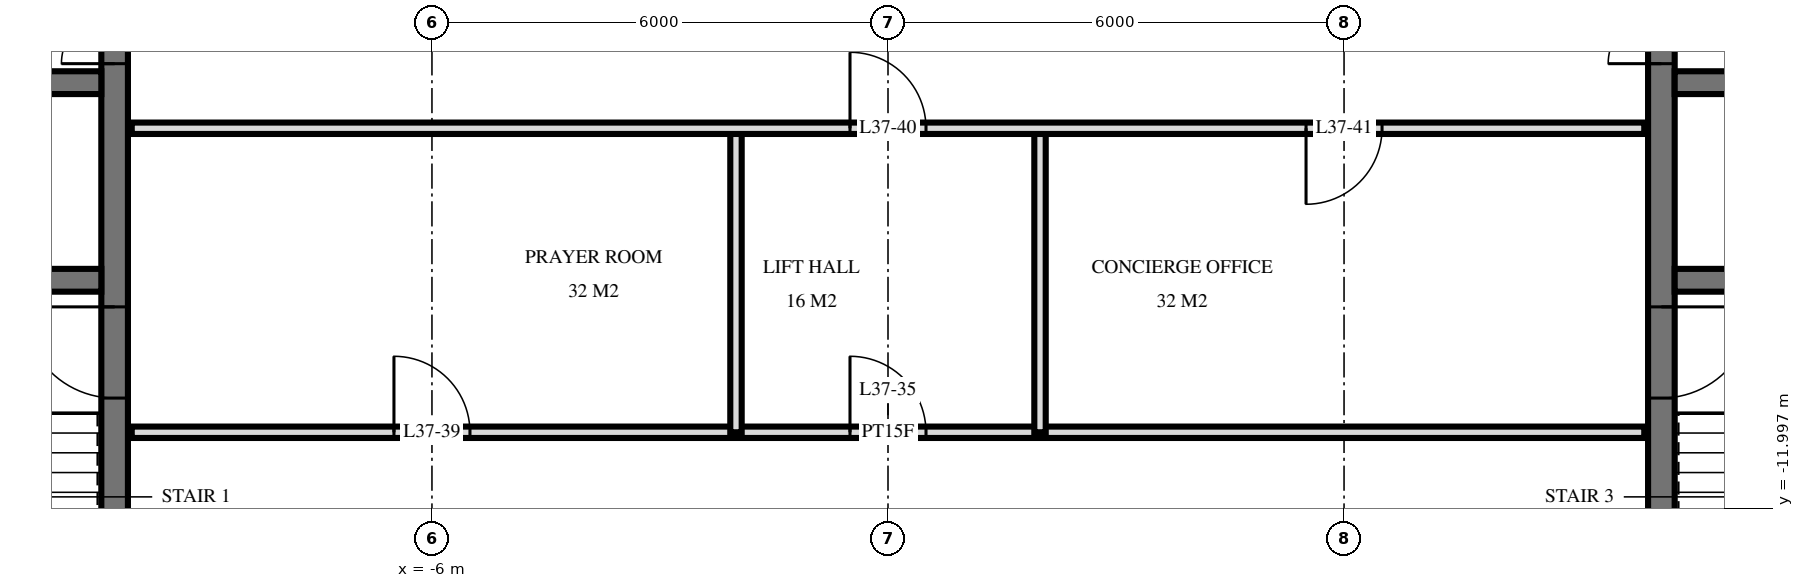
"""IFC4 building model, lengths in metres.
Left out: names, types, materials, properties, quantities, classifications, styles, units other than length and angle.
Written with IfcOpenShell. Run it as: python <this file> out.ifc"""

import sys

from ifc_helpers import new_model, si_unit, direction, frame, frame_2d, origin, place, context, subcontext, project, spatial, rectangle, extrude, element, fill, save


model = new_model("IFC4")
c1 = context("Model", 3, precision=1e-05, world=origin(), true_north=direction((0.0, 1.0)))
c2 = subcontext(c1, "Body", "Model", "MODEL_VIEW")
j1 = project(units=[si_unit("LENGTHUNIT", "METRE"), si_unit("PLANEANGLEUNIT", "RADIAN")], contexts=[c1])
p1 = place(None, origin())
s1 = spatial("IfcSite", under=j1, at=p1, CompositionType="ELEMENT")
p2 = place(p1, origin())
s2 = spatial("IfcBuilding", under=s1, at=p2, CompositionType="ELEMENT")
p3 = place(p2, frame((0.0, 0.0, 145.2)))
s3 = spatial("IfcBuildingStorey", under=s2, at=p3, CompositionType="ELEMENT", Elevation=145.2)
p4 = place(p3, frame((-10.175, -14.55, 0.0), z_axis=(0.0, 0.0, 1.0), x_axis=(0.0, 1.0, 0.0)))
e1 = element("IfcWall", 1, at=p4, inside=s3, PredefinedType="SHEAR", context=c2, shape_type="SweptSolid", body=[
    extrude(rectangle(XDim=14.1, YDim=0.35, at=frame_2d((7.05, 0.0))), origin(), (0.0, 0.0, 1.0), 3.6),
])
p5 = place(p4, frame((8.4, 0.0, 0.0)))
e2 = element("IfcOpeningElement", 2, at=p5, cuts=e1, PredefinedType="OPENING", context=c2, shape_type="SweptSolid", body=[
    extrude(rectangle(XDim=1.4, YDim=2.4, at=frame_2d((0.7, 1.2))), frame((0.0, 0.185, 0.0), z_axis=(0.0, -1.0, 0.0), x_axis=(1.0, 0.0, 0.0)), (0.0, 0.0, 1.0), 0.37),
])
p6 = place(p4, frame((10.0, 0.0, 0.0)))
e3 = element("IfcOpeningElement", 3, at=p6, cuts=e1, PredefinedType="OPENING", context=c2, shape_type="SweptSolid", body=[
    extrude(rectangle(XDim=1.4, YDim=2.4, at=frame_2d((0.7, 1.2))), frame((0.0, 0.185, 0.0), z_axis=(0.0, -1.0, 0.0), x_axis=(1.0, 0.0, 0.0)), (0.0, 0.0, 1.0), 0.37),
])
p7 = place(p4, frame((4.0, 0.0, 0.0)))
e4 = element("IfcOpeningElement", 4, at=p7, cuts=e1, PredefinedType="OPENING", context=c2, shape_type="SweptSolid", body=[
    extrude(rectangle(XDim=1.2, YDim=2.1, at=frame_2d((0.6, 1.05))), frame((0.0, 0.185, 0.0), z_axis=(0.0, -1.0, 0.0), x_axis=(1.0, 0.0, 0.0)), (0.0, 0.0, 1.0), 0.37),
])
p8 = place(p3, frame((-24.05, -6.4, 0.0), z_axis=(0.0, 0.0, 1.0), x_axis=(1.0, 0.0, 0.0)))
e5 = element("IfcWall", 5, at=p8, inside=s3, PredefinedType="SHEAR", context=c2, shape_type="SweptSolid", body=[
    extrude(rectangle(XDim=13.7, YDim=0.3, at=frame_2d((6.85, 0.0))), origin(), (0.0, 0.0, 1.0), 3.6),
])
p9 = place(p8, frame((0.55, 0.0, 0.0)))
e6 = element("IfcOpeningElement", 6, at=p9, cuts=e5, PredefinedType="OPENING", context=c2, shape_type="SweptSolid", body=[
    extrude(rectangle(XDim=1.1, YDim=2.1, at=frame_2d((0.55, 1.05))), frame((0.0, 0.16, 0.0), z_axis=(0.0, -1.0, 0.0), x_axis=(1.0, 0.0, 0.0)), (0.0, 0.0, 1.0), 0.32),
])
p10 = place(p8, frame((5.8, 0.0, 0.0)))
e7 = element("IfcOpeningElement", 7, at=p10, cuts=e5, PredefinedType="OPENING", context=c2, shape_type="SweptSolid", body=[
    extrude(rectangle(XDim=1.1, YDim=2.1, at=frame_2d((0.55, 1.05))), frame((0.0, 0.16, 0.0), z_axis=(0.0, -1.0, 0.0), x_axis=(1.0, 0.0, 0.0)), (0.0, 0.0, 1.0), 0.32),
])
p11 = place(p3, frame((-24.05, -9.0, 0.0), z_axis=(0.0, 0.0, 1.0), x_axis=(1.0, 0.0, 0.0)))
e8 = element("IfcWall", 8, at=p11, inside=s3, PredefinedType="SHEAR", context=c2, shape_type="SweptSolid", body=[
    extrude(rectangle(XDim=13.7, YDim=0.3, at=frame_2d((6.85, 0.0))), origin(), (0.0, 0.0, 1.0), 3.6),
])
p12 = place(p11, frame((8.8, 0.0, 0.0)))
e9 = element("IfcOpeningElement", 9, at=p12, cuts=e8, PredefinedType="OPENING", context=c2, shape_type="SweptSolid", body=[
    extrude(rectangle(XDim=1.1, YDim=2.1, at=frame_2d((0.55, 1.05))), frame((0.0, 0.16, 0.0), z_axis=(0.0, -1.0, 0.0), x_axis=(1.0, 0.0, 0.0)), (0.0, 0.0, 1.0), 0.32),
])
p13 = place(p3, frame((10.175, -14.55, 0.0), z_axis=(0.0, 0.0, 1.0), x_axis=(0.0, 1.0, 0.0)))
e10 = element("IfcWall", 10, at=p13, inside=s3, PredefinedType="SHEAR", context=c2, shape_type="SweptSolid", body=[
    extrude(rectangle(XDim=14.1, YDim=0.35, at=frame_2d((7.05, 0.0))), origin(), (0.0, 0.0, 1.0), 3.6),
])
p14 = place(p13, frame((8.4, 0.0, 0.0)))
e11 = element("IfcOpeningElement", 11, at=p14, cuts=e10, PredefinedType="OPENING", context=c2, shape_type="SweptSolid", body=[
    extrude(rectangle(XDim=1.4, YDim=2.4, at=frame_2d((0.7, 1.2))), frame((0.0, 0.185, 0.0), z_axis=(0.0, -1.0, 0.0), x_axis=(1.0, 0.0, 0.0)), (0.0, 0.0, 1.0), 0.37),
])
p15 = place(p13, frame((10.0, 0.0, 0.0)))
e12 = element("IfcOpeningElement", 12, at=p15, cuts=e10, PredefinedType="OPENING", context=c2, shape_type="SweptSolid", body=[
    extrude(rectangle(XDim=1.4, YDim=2.4, at=frame_2d((0.7, 1.2))), frame((0.0, 0.185, 0.0), z_axis=(0.0, -1.0, 0.0), x_axis=(1.0, 0.0, 0.0)), (0.0, 0.0, 1.0), 0.37),
])
p16 = place(p13, frame((4.0, 0.0, 0.0)))
e13 = element("IfcOpeningElement", 13, at=p16, cuts=e10, PredefinedType="OPENING", context=c2, shape_type="SweptSolid", body=[
    extrude(rectangle(XDim=1.2, YDim=2.1, at=frame_2d((0.6, 1.05))), frame((0.0, 0.185, 0.0), z_axis=(0.0, -1.0, 0.0), x_axis=(1.0, 0.0, 0.0)), (0.0, 0.0, 1.0), 0.37),
])
p17 = place(p3, frame((10.35, -6.4, 0.0), z_axis=(0.0, 0.0, 1.0), x_axis=(1.0, 0.0, 0.0)))
e14 = element("IfcWall", 14, at=p17, inside=s3, PredefinedType="SHEAR", context=c2, shape_type="SweptSolid", body=[
    extrude(rectangle(XDim=13.7, YDim=0.3, at=frame_2d((6.85, 0.0))), origin(), (0.0, 0.0, 1.0), 3.6),
])
p18 = place(p17, frame((12.05, 0.0, 0.0)))
e15 = element("IfcOpeningElement", 15, at=p18, cuts=e14, PredefinedType="OPENING", context=c2, shape_type="SweptSolid", body=[
    extrude(rectangle(XDim=1.1, YDim=2.1, at=frame_2d((0.55, 1.05))), frame((0.0, 0.16, 0.0), z_axis=(0.0, -1.0, 0.0), x_axis=(1.0, 0.0, 0.0)), (0.0, 0.0, 1.0), 0.32),
])
p19 = place(p17, frame((6.8, 0.0, 0.0)))
e16 = element("IfcOpeningElement", 16, at=p19, cuts=e14, PredefinedType="OPENING", context=c2, shape_type="SweptSolid", body=[
    extrude(rectangle(XDim=1.1, YDim=2.1, at=frame_2d((0.55, 1.05))), frame((0.0, 0.16, 0.0), z_axis=(0.0, -1.0, 0.0), x_axis=(1.0, 0.0, 0.0)), (0.0, 0.0, 1.0), 0.32),
])
p20 = place(p3, frame((10.35, -9.0, 0.0), z_axis=(0.0, 0.0, 1.0), x_axis=(1.0, 0.0, 0.0)))
e17 = element("IfcWall", 17, at=p20, inside=s3, PredefinedType="SHEAR", context=c2, shape_type="SweptSolid", body=[
    extrude(rectangle(XDim=13.7, YDim=0.3, at=frame_2d((6.85, 0.0))), origin(), (0.0, 0.0, 1.0), 3.6),
])
p21 = place(p20, frame((3.8, 0.0, 0.0)))
e18 = element("IfcOpeningElement", 18, at=p21, cuts=e17, PredefinedType="OPENING", context=c2, shape_type="SweptSolid", body=[
    extrude(rectangle(XDim=1.1, YDim=2.1, at=frame_2d((0.55, 1.05))), frame((0.0, 0.16, 0.0), z_axis=(0.0, -1.0, 0.0), x_axis=(1.0, 0.0, 0.0)), (0.0, 0.0, 1.0), 0.32),
])
for number, where, z_axis, x_axis in (
    (19, (2.0, -11.0, 0.0), (0.0, 0.0, 1.0), (0.0, 1.0, 0.0)),
    (20, (-2.0, -11.0, 0.0), (0.0, 0.0, 1.0), (0.0, 1.0, 0.0)),
):
    element("IfcWall", number, at=place(p3, frame(where, z_axis=z_axis, x_axis=x_axis)), inside=s3, PredefinedType="PARTITIONING", context=c2, shape_type="SweptSolid", body=[
        extrude(rectangle(XDim=4.0, YDim=0.15, at=frame_2d((2.0, 0.0))), origin(), (0.0, 0.0, 1.0), 3.32),
    ])
p22 = place(p3, frame((-9.95, -11.0, 0.0), z_axis=(0.0, 0.0, 1.0), x_axis=(1.0, 0.0, 0.0)))
e21 = element("IfcWall", 21, at=p22, inside=s3, PredefinedType="PARTITIONING", context=c2, shape_type="SweptSolid", body=[
    extrude(rectangle(XDim=19.9, YDim=0.15, at=frame_2d((9.95, 0.0))), origin(), (0.0, 0.0, 1.0), 3.32),
])
p23 = place(p22, frame((9.45, 0.0, 0.0)))
e22 = element("IfcOpeningElement", 22, at=p23, cuts=e21, PredefinedType="OPENING", context=c2, shape_type="SweptSolid", body=[
    extrude(rectangle(XDim=1.0, YDim=2.1, at=frame_2d((0.5, 1.05))), frame((0.0, 0.085, 0.0), z_axis=(0.0, -1.0, 0.0), x_axis=(1.0, 0.0, 0.0)), (0.0, 0.0, 1.0), 0.17),
])
p24 = place(p22, frame((3.45, 0.0, 0.0)))
e23 = element("IfcOpeningElement", 23, at=p24, cuts=e21, PredefinedType="OPENING", context=c2, shape_type="SweptSolid", body=[
    extrude(rectangle(XDim=1.0, YDim=2.1, at=frame_2d((0.5, 1.05))), frame((0.0, 0.085, 0.0), z_axis=(0.0, -1.0, 0.0), x_axis=(1.0, 0.0, 0.0)), (0.0, 0.0, 1.0), 0.17),
])
p25 = place(p3, frame((-9.95, -7.0, 0.0), z_axis=(0.0, 0.0, 1.0), x_axis=(1.0, 0.0, 0.0)))
e24 = element("IfcWall", 24, at=p25, inside=s3, PredefinedType="PARTITIONING", context=c2, shape_type="SweptSolid", body=[
    extrude(rectangle(XDim=19.9, YDim=0.15, at=frame_2d((9.95, 0.0))), origin(), (0.0, 0.0, 1.0), 3.32),
])
p26 = place(p25, frame((9.45, 0.0, 0.0)))
e25 = element("IfcOpeningElement", 25, at=p26, cuts=e24, PredefinedType="OPENING", context=c2, shape_type="SweptSolid", body=[
    extrude(rectangle(XDim=1.0, YDim=2.1, at=frame_2d((0.5, 1.05))), frame((0.0, 0.085, 0.0), z_axis=(0.0, -1.0, 0.0), x_axis=(1.0, 0.0, 0.0)), (0.0, 0.0, 1.0), 0.17),
])
p27 = place(p25, frame((15.45, 0.0, 0.0)))
e26 = element("IfcOpeningElement", 26, at=p27, cuts=e24, PredefinedType="OPENING", context=c2, shape_type="SweptSolid", body=[
    extrude(rectangle(XDim=1.0, YDim=2.1, at=frame_2d((0.5, 1.05))), frame((0.0, 0.085, 0.0), z_axis=(0.0, -1.0, 0.0), x_axis=(1.0, 0.0, 0.0)), (0.0, 0.0, 1.0), 0.17),
])
p28 = place(p5, origin())
e27 = element("IfcDoor", 27, at=p28, inside=s3, OperationType="DOUBLE_DOOR_SINGLE_SWING", PredefinedType="DOOR", context=c2, shape_type="SweptSolid", body=[
    extrude(rectangle(XDim=1.4, YDim=2.4, at=frame_2d((0.7, 1.2))), frame((0.0, 0.025, 0.0), z_axis=(0.0, -1.0, 0.0), x_axis=(1.0, 0.0, 0.0)), (0.0, 0.0, 1.0), 0.05),
])
fill(e2, e27)
p29 = place(p7, origin())
e28 = element("IfcDoor", 28, at=p29, inside=s3, OperationType="SINGLE_SWING_LEFT", PredefinedType="DOOR", context=c2, shape_type="SweptSolid", body=[
    extrude(rectangle(XDim=1.2, YDim=2.1, at=frame_2d((0.6, 1.05))), frame((0.0, 0.025, 0.0), z_axis=(0.0, -1.0, 0.0), x_axis=(1.0, 0.0, 0.0)), (0.0, 0.0, 1.0), 0.05),
])
fill(e4, e28)
p30 = place(p14, origin())
e29 = element("IfcDoor", 29, at=p30, inside=s3, OperationType="DOUBLE_DOOR_SINGLE_SWING", PredefinedType="DOOR", context=c2, shape_type="SweptSolid", body=[
    extrude(rectangle(XDim=1.4, YDim=2.4, at=frame_2d((0.7, 1.2))), frame((0.0, 0.025, 0.0), z_axis=(0.0, -1.0, 0.0), x_axis=(1.0, 0.0, 0.0)), (0.0, 0.0, 1.0), 0.05),
])
fill(e11, e29)
p31 = place(p16, frame((0.6, 0.0, 0.0), z_axis=(0.0, 0.0, 1.0), x_axis=(-1.0, 0.0, 0.0)))
e30 = element("IfcDoor", 30, at=p31, inside=s3, OperationType="SINGLE_SWING_RIGHT", PredefinedType="DOOR", context=c2, shape_type="SweptSolid", body=[
    extrude(rectangle(XDim=1.2, YDim=2.1, at=frame_2d((0.0, 1.05))), frame((0.0, -0.025, 0.0), z_axis=(0.0, 1.0, 0.0), x_axis=(-1.0, 0.0, 0.0)), (0.0, 0.0, 1.0), 0.05),
])
fill(e13, e30)
p32 = place(p23, origin())
e31 = element("IfcDoor", 31, at=p32, inside=s3, OperationType="SINGLE_SWING_RIGHT", PredefinedType="DOOR", context=c2, shape_type="SweptSolid", body=[
    extrude(rectangle(XDim=1.0, YDim=2.1, at=frame_2d((0.5, 1.05))), frame((0.0, 0.025, 0.0), z_axis=(0.0, -1.0, 0.0), x_axis=(1.0, 0.0, 0.0)), (0.0, 0.0, 1.0), 0.05),
])
fill(e22, e31)
p33 = place(p24, origin())
e32 = element("IfcDoor", 32, at=p33, inside=s3, OperationType="SINGLE_SWING_RIGHT", PredefinedType="DOOR", context=c2, shape_type="SweptSolid", body=[
    extrude(rectangle(XDim=1.0, YDim=2.1, at=frame_2d((0.5, 1.05))), frame((0.0, 0.025, 0.0), z_axis=(0.0, -1.0, 0.0), x_axis=(1.0, 0.0, 0.0)), (0.0, 0.0, 1.0), 0.05),
])
fill(e23, e32)
p34 = place(p26, origin())
e33 = element("IfcDoor", 33, at=p34, inside=s3, OperationType="SINGLE_SWING_RIGHT", PredefinedType="DOOR", context=c2, shape_type="SweptSolid", body=[
    extrude(rectangle(XDim=1.0, YDim=2.1, at=frame_2d((0.5, 1.05))), frame((0.0, 0.025, 0.0), z_axis=(0.0, -1.0, 0.0), x_axis=(1.0, 0.0, 0.0)), (0.0, 0.0, 1.0), 0.05),
])
fill(e25, e33)
p35 = place(p27, frame((0.5, 0.0, 0.0), z_axis=(0.0, 0.0, 1.0), x_axis=(-1.0, 0.0, 0.0)))
e34 = element("IfcDoor", 34, at=p35, inside=s3, OperationType="SINGLE_SWING_LEFT", PredefinedType="DOOR", context=c2, shape_type="SweptSolid", body=[
    extrude(rectangle(XDim=1.0, YDim=2.1, at=frame_2d((0.0, 1.05))), frame((0.0, -0.025, 0.0), z_axis=(0.0, 1.0, 0.0), x_axis=(-1.0, 0.0, 0.0)), (0.0, 0.0, 1.0), 0.05),
])
fill(e26, e34)
save(model, sys.argv[1])
